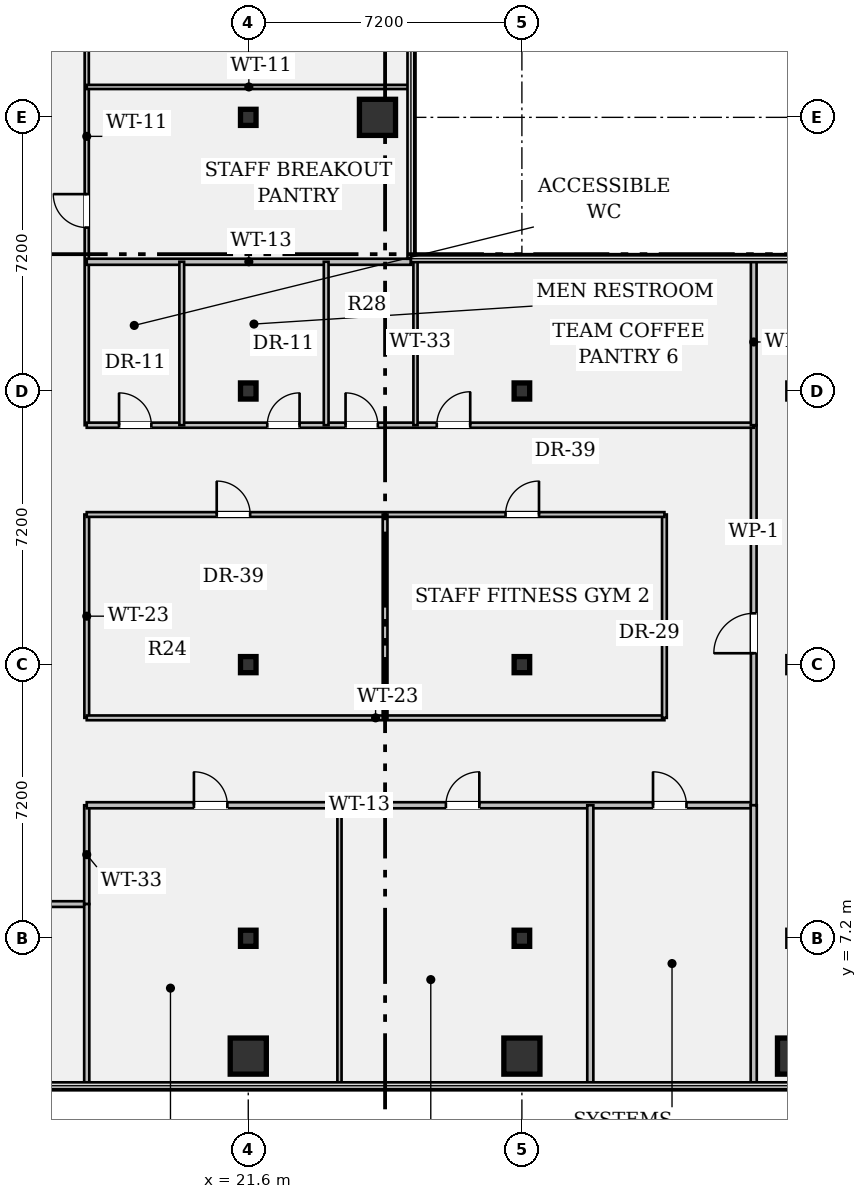
"""IFC4 building model, lengths in metres.
Left out: names, types, materials, properties, quantities, classifications, styles, units other than length and angle.
Written with IfcOpenShell. Run it as: python <this file> out.ifc"""

import sys

from ifc_helpers import new_model, si_unit, direction, frame, frame_2d, origin, origin_2d, place, context, subcontext, project, spatial, rectangle, hollow_rectangle, i_section, extrude, element, fill, save


model = new_model("IFC4")
c1 = context("Model", 3, precision=1e-05, world=origin(), true_north=direction((0.0, 1.0)))
c2 = subcontext(c1, "Body", "Model", "MODEL_VIEW")
j1 = project(units=[si_unit("LENGTHUNIT", "METRE"), si_unit("PLANEANGLEUNIT", "RADIAN")], contexts=[c1])
p1 = place(None, origin())
s1 = spatial("IfcSite", under=j1, at=p1, CompositionType="ELEMENT")
p2 = place(p1, origin())
s2 = spatial("IfcBuilding", under=s1, at=p2, CompositionType="ELEMENT")
p3 = place(p2, frame((0.0, 0.0, 106.05)))
s3 = spatial("IfcBuildingStorey", under=s2, at=p3, CompositionType="ELEMENT", Elevation=106.05)
p4 = place(p3, frame((21.6, 4.1, 0.0), z_axis=(0.0, 0.0, 1.0), x_axis=(1.0, 0.0, 0.0)))
e1 = element("IfcColumn", 1, at=p4, inside=s3, PredefinedType="COLUMN", context=c2, shape_type="SweptSolid", body=[
    extrude(hollow_rectangle(XDim=0.95, YDim=0.95, WallThickness=0.06, at=origin_2d()), origin(), (0.0, 0.0, 1.0), 3.58),
])
for number, where, z_axis, x_axis in (
    (2, (21.6, 7.2, 0.0), (0.0, 0.0, 1.0), (1.0, 0.0, 0.0)),
    (3, (21.6, 14.4, 0.0), (0.0, 0.0, 1.0), (1.0, 0.0, 0.0)),
    (4, (21.6, 21.6, 0.0), (0.0, 0.0, 1.0), (1.0, 0.0, 0.0)),
    (5, (21.6, 28.8, 0.0), (0.0, 0.0, 1.0), (1.0, 0.0, 0.0)),
):
    element("IfcColumn", number, at=place(p3, frame(where, z_axis=z_axis, x_axis=x_axis)), inside=s3, PredefinedType="COLUMN", context=c2, shape_type="SweptSolid", body=[
        extrude(i_section(OverallWidth=0.409, OverallDepth=0.424, WebThickness=0.033, FlangeThickness=0.052, FilletRadius=0.018, at=origin_2d()), origin(), (0.0, 0.0, 1.0), 3.58),
    ])
for number, where, z_axis, x_axis in (
    (6, (25.0, 28.8, 0.0), (0.0, 0.0, 1.0), (1.0, 0.0, 0.0)),
    (7, (28.8, 4.1, 0.0), (0.0, 0.0, 1.0), (1.0, 0.0, 0.0)),
):
    element("IfcColumn", number, at=place(p3, frame(where, z_axis=z_axis, x_axis=x_axis)), inside=s3, PredefinedType="COLUMN", context=c2, shape_type="SweptSolid", body=[
        extrude(hollow_rectangle(XDim=0.95, YDim=0.95, WallThickness=0.06, at=origin_2d()), origin(), (0.0, 0.0, 1.0), 3.58),
    ])
for number, where, z_axis, x_axis in (
    (8, (28.8, 7.2, 0.0), (0.0, 0.0, 1.0), (1.0, 0.0, 0.0)),
    (9, (28.8, 14.4, 0.0), (0.0, 0.0, 1.0), (1.0, 0.0, 0.0)),
    (10, (28.8, 21.6, 0.0), (0.0, 0.0, 1.0), (1.0, 0.0, 0.0)),
):
    element("IfcColumn", number, at=place(p3, frame(where, z_axis=z_axis, x_axis=x_axis)), inside=s3, PredefinedType="COLUMN", context=c2, shape_type="SweptSolid", body=[
        extrude(i_section(OverallWidth=0.409, OverallDepth=0.424, WebThickness=0.033, FlangeThickness=0.052, FilletRadius=0.018, at=origin_2d()), origin(), (0.0, 0.0, 1.0), 3.58),
    ])
p5 = place(p3, frame((36.0, 4.1, 0.0), z_axis=(0.0, 0.0, 1.0), x_axis=(1.0, 0.0, 0.0)))
e11 = element("IfcColumn", 11, at=p5, inside=s3, PredefinedType="COLUMN", context=c2, shape_type="SweptSolid", body=[
    extrude(hollow_rectangle(XDim=0.95, YDim=0.95, WallThickness=0.06, at=origin_2d()), origin(), (0.0, 0.0, 1.0), 3.58),
])
for number, where, z_axis, x_axis in (
    (12, (36.0, 7.2, 0.0), (0.0, 0.0, 1.0), (1.0, 0.0, 0.0)),
    (13, (36.0, 14.4, 0.0), (0.0, 0.0, 1.0), (1.0, 0.0, 0.0)),
    (14, (36.0, 21.6, 0.0), (0.0, 0.0, 1.0), (1.0, 0.0, 0.0)),
):
    element("IfcColumn", number, at=place(p3, frame(where, z_axis=z_axis, x_axis=x_axis)), inside=s3, PredefinedType="COLUMN", context=c2, shape_type="SweptSolid", body=[
        extrude(i_section(OverallWidth=0.409, OverallDepth=0.424, WebThickness=0.033, FlangeThickness=0.052, FilletRadius=0.018, at=origin_2d()), origin(), (0.0, 0.0, 1.0), 3.58),
    ])
p6 = place(p3, frame((14.4, 8.1, 0.0), z_axis=(0.0, 0.0, 1.0), x_axis=(1.0, 0.0, 0.0)))
e15 = element("IfcWall", 15, at=p6, inside=s3, PredefinedType="PARTITIONING", context=c2, shape_type="SweptSolid", body=[
    extrude(rectangle(XDim=2.95, YDim=0.15, at=frame_2d((1.475, 0.0))), origin(), (0.0, 0.0, 1.0), 3.098),
])
p7 = place(p6, frame((0.95, 0.0, 0.0)))
e16 = element("IfcOpeningElement", 16, at=p7, cuts=e15, PredefinedType="OPENING", context=c2, shape_type="SweptSolid", body=[
    extrude(rectangle(XDim=0.88, YDim=2.15, at=frame_2d((0.44, 1.075))), frame((0.0, 0.087, 0.0), z_axis=(0.0, -1.0, 0.0), x_axis=(1.0, 0.0, 0.0)), (0.0, 0.0, 1.0), 0.174),
])
p8 = place(p3, frame((17.35, 8.1, 0.0), z_axis=(0.0, 0.0, 1.0), x_axis=(0.0, 1.0, 0.0)))
e17 = element("IfcWall", 17, at=p8, inside=s3, PredefinedType="PARTITIONING", context=c2, shape_type="SweptSolid", body=[
    extrude(rectangle(XDim=2.6, YDim=0.135, at=frame_2d((1.3, 0.0))), origin(), (0.0, 0.0, 1.0), 3.58),
])
p9 = place(p3, frame((17.35, 20.7, 0.0), z_axis=(0.0, 0.0, 1.0), x_axis=(0.0, 1.0, 0.0)))
e18 = element("IfcWall", 18, at=p9, inside=s3, PredefinedType="PARTITIONING", context=c2, shape_type="SweptSolid", body=[
    extrude(rectangle(XDim=15.2, YDim=0.11, at=frame_2d((7.6, 0.0))), origin(), (0.0, 0.0, 1.0), 2.793),
])
p10 = place(p9, frame((5.2, 0.0, 0.0)))
e19 = element("IfcOpeningElement", 19, at=p10, cuts=e18, PredefinedType="OPENING", context=c2, shape_type="SweptSolid", body=[
    extrude(rectangle(XDim=0.88, YDim=2.15, at=frame_2d((0.44, 1.075))), frame((0.0, 0.067, 0.0), z_axis=(0.0, -1.0, 0.0), x_axis=(1.0, 0.0, 0.0)), (0.0, 0.0, 1.0), 0.134),
])
p11 = place(p9, frame((10.6, 0.0, 0.0)))
e20 = element("IfcOpeningElement", 20, at=p11, cuts=e18, PredefinedType="OPENING", context=c2, shape_type="SweptSolid", body=[
    extrude(rectangle(XDim=1.0, YDim=2.15, at=frame_2d((0.5, 1.075))), frame((0.0, 0.067, 0.0), z_axis=(0.0, -1.0, 0.0), x_axis=(1.0, 0.0, 0.0)), (0.0, 0.0, 1.0), 0.134),
])
p12 = place(p3, frame((17.35, 10.7, 0.0), z_axis=(0.0, 0.0, 1.0), x_axis=(1.0, 0.0, 0.0)))
e21 = element("IfcWall", 21, at=p12, inside=s3, PredefinedType="PARTITIONING", context=c2, shape_type="SweptSolid", body=[
    extrude(rectangle(XDim=17.55, YDim=0.16, at=frame_2d((8.775, 0.0))), origin(), (0.0, 0.0, 1.0), 2.793),
])
p13 = place(p12, frame((2.82, 0.0, 0.0)))
e22 = element("IfcOpeningElement", 22, at=p13, cuts=e21, PredefinedType="OPENING", context=c2, shape_type="SweptSolid", body=[
    extrude(rectangle(XDim=0.88, YDim=2.15, at=frame_2d((0.44, 1.075))), frame((0.0, 0.092, 0.0), z_axis=(0.0, -1.0, 0.0), x_axis=(1.0, 0.0, 0.0)), (0.0, 0.0, 1.0), 0.184),
])
p14 = place(p12, frame((9.45, 0.0, 0.0)))
e23 = element("IfcOpeningElement", 23, at=p14, cuts=e21, PredefinedType="OPENING", context=c2, shape_type="SweptSolid", body=[
    extrude(rectangle(XDim=0.88, YDim=2.15, at=frame_2d((0.44, 1.075))), frame((0.0, 0.092, 0.0), z_axis=(0.0, -1.0, 0.0), x_axis=(1.0, 0.0, 0.0)), (0.0, 0.0, 1.0), 0.184),
])
p15 = place(p12, frame((14.9, 0.0, 0.0)))
e24 = element("IfcOpeningElement", 24, at=p15, cuts=e21, PredefinedType="OPENING", context=c2, shape_type="SweptSolid", body=[
    extrude(rectangle(XDim=0.88, YDim=2.15, at=frame_2d((0.44, 1.075))), frame((0.0, 0.092, 0.0), z_axis=(0.0, -1.0, 0.0), x_axis=(1.0, 0.0, 0.0)), (0.0, 0.0, 1.0), 0.184),
])
p16 = place(p3, frame((34.9, 10.7, 0.0), z_axis=(0.0, 0.0, 1.0), x_axis=(0.0, 1.0, 0.0)))
e25 = element("IfcWall", 25, at=p16, inside=s3, PredefinedType="PARTITIONING", context=c2, shape_type="SweptSolid", body=[
    extrude(rectangle(XDim=10.0, YDim=0.15, at=frame_2d((5.0, 0.0))), origin(), (0.0, 0.0, 1.0), 2.793),
])
p17 = place(p16, frame((4.0, 0.0, 0.0)))
e26 = element("IfcOpeningElement", 26, at=p17, cuts=e25, PredefinedType="OPENING", context=c2, shape_type="SweptSolid", body=[
    extrude(rectangle(XDim=1.05, YDim=2.15, at=frame_2d((0.525, 1.075))), frame((0.0, 0.087, 0.0), z_axis=(0.0, -1.0, 0.0), x_axis=(1.0, 0.0, 0.0)), (0.0, 0.0, 1.0), 0.174),
])
p18 = place(p3, frame((17.35, 20.7, 0.0), z_axis=(0.0, 0.0, 1.0), x_axis=(1.0, 0.0, 0.0)))
e27 = element("IfcWall", 27, at=p18, inside=s3, PredefinedType="PARTITIONING", context=c2, shape_type="SweptSolid", body=[
    extrude(rectangle(XDim=17.55, YDim=0.135, at=frame_2d((8.775, 0.0))), origin(), (0.0, 0.0, 1.0), 2.793),
])
p19 = place(p18, frame((0.85, 0.0, 0.0)))
e28 = element("IfcOpeningElement", 28, at=p19, cuts=e27, PredefinedType="OPENING", context=c2, shape_type="SweptSolid", body=[
    extrude(rectangle(XDim=0.85, YDim=2.15, at=frame_2d((0.425, 1.075))), frame((0.0, 0.08, 0.0), z_axis=(0.0, -1.0, 0.0), x_axis=(1.0, 0.0, 0.0)), (0.0, 0.0, 1.0), 0.159),
])
p20 = place(p18, frame((4.75, 0.0, 0.0)))
e29 = element("IfcOpeningElement", 29, at=p20, cuts=e27, PredefinedType="OPENING", context=c2, shape_type="SweptSolid", body=[
    extrude(rectangle(XDim=0.85, YDim=2.15, at=frame_2d((0.425, 1.075))), frame((0.0, 0.08, 0.0), z_axis=(0.0, -1.0, 0.0), x_axis=(1.0, 0.0, 0.0)), (0.0, 0.0, 1.0), 0.159),
])
p21 = place(p18, frame((6.81, 0.0, 0.0)))
e30 = element("IfcOpeningElement", 30, at=p21, cuts=e27, PredefinedType="OPENING", context=c2, shape_type="SweptSolid", body=[
    extrude(rectangle(XDim=0.85, YDim=2.15, at=frame_2d((0.425, 1.075))), frame((0.0, 0.08, 0.0), z_axis=(0.0, -1.0, 0.0), x_axis=(1.0, 0.0, 0.0)), (0.0, 0.0, 1.0), 0.159),
])
p22 = place(p18, frame((9.21, 0.0, 0.0)))
e31 = element("IfcOpeningElement", 31, at=p22, cuts=e27, PredefinedType="OPENING", context=c2, shape_type="SweptSolid", body=[
    extrude(rectangle(XDim=0.88, YDim=2.15, at=frame_2d((0.44, 1.075))), frame((0.0, 0.08, 0.0), z_axis=(0.0, -1.0, 0.0), x_axis=(1.0, 0.0, 0.0)), (0.0, 0.0, 1.0), 0.159),
])
p23 = place(p3, frame((17.35, 13.0, 0.0), z_axis=(0.0, 0.0, 1.0), x_axis=(0.0, 1.0, 0.0)))
e32 = element("IfcWall", 32, at=p23, inside=s3, PredefinedType="PARTITIONING", context=c2, shape_type="SweptSolid", body=[
    extrude(rectangle(XDim=5.35, YDim=0.125, at=frame_2d((2.675, 0.0))), origin(), (0.0, 0.0, 1.0), 2.793),
])
p24 = place(p3, frame((17.35, 13.0, 0.0), z_axis=(0.0, 0.0, 1.0), x_axis=(1.0, 0.0, 0.0)))
e33 = element("IfcWall", 33, at=p24, inside=s3, PredefinedType="PARTITIONING", context=c2, shape_type="SweptSolid", body=[
    extrude(rectangle(XDim=15.2, YDim=0.125, at=frame_2d((7.6, 0.0))), origin(), (0.0, 0.0, 1.0), 2.793),
])
p25 = place(p3, frame((32.55, 13.0, 0.0), z_axis=(0.0, 0.0, 1.0), x_axis=(0.0, 1.0, 0.0)))
e34 = element("IfcWall", 34, at=p25, inside=s3, PredefinedType="PARTITIONING", context=c2, shape_type="SweptSolid", body=[
    extrude(rectangle(XDim=5.35, YDim=0.125, at=frame_2d((2.675, 0.0))), origin(), (0.0, 0.0, 1.0), 2.793),
])
p26 = place(p3, frame((17.35, 18.35, 0.0), z_axis=(0.0, 0.0, 1.0), x_axis=(1.0, 0.0, 0.0)))
e35 = element("IfcWall", 35, at=p26, inside=s3, PredefinedType="PARTITIONING", context=c2, shape_type="SweptSolid", body=[
    extrude(rectangle(XDim=15.2, YDim=0.125, at=frame_2d((7.6, 0.0))), origin(), (0.0, 0.0, 1.0), 2.793),
])
p27 = place(p26, frame((3.42, 0.0, 0.0)))
e36 = element("IfcOpeningElement", 36, at=p27, cuts=e35, PredefinedType="OPENING", context=c2, shape_type="SweptSolid", body=[
    extrude(rectangle(XDim=0.88, YDim=2.15, at=frame_2d((0.44, 1.075))), frame((0.0, 0.074, 0.0), z_axis=(0.0, -1.0, 0.0), x_axis=(1.0, 0.0, 0.0)), (0.0, 0.0, 1.0), 0.149),
])
p28 = place(p26, frame((11.02, 0.0, 0.0)))
e37 = element("IfcOpeningElement", 37, at=p28, cuts=e35, PredefinedType="OPENING", context=c2, shape_type="SweptSolid", body=[
    extrude(rectangle(XDim=0.88, YDim=2.15, at=frame_2d((0.44, 1.075))), frame((0.0, 0.074, 0.0), z_axis=(0.0, -1.0, 0.0), x_axis=(1.0, 0.0, 0.0)), (0.0, 0.0, 1.0), 0.149),
])
p29 = place(p3, frame((25.2, 13.0, 0.0), z_axis=(0.0, 0.0, 1.0), x_axis=(0.0, 1.0, 0.0)))
e38 = element("IfcWall", 38, at=p29, inside=s3, PredefinedType="PARTITIONING", context=c2, shape_type="SweptSolid", body=[
    extrude(rectangle(XDim=5.35, YDim=0.125, at=frame_2d((2.675, 0.0))), origin(), (0.0, 0.0, 1.0), 2.793),
])
p30 = place(p3, frame((17.35, 25.0, 0.0), z_axis=(0.0, 0.0, 1.0), x_axis=(1.0, 0.0, 0.0)))
e39 = element("IfcWall", 39, at=p30, inside=s3, PredefinedType="PARTITIONING", context=c2, shape_type="SweptSolid", body=[
    extrude(rectangle(XDim=8.53, YDim=0.16, at=frame_2d((4.265, 0.0))), origin(), (0.0, 0.0, 1.0), 2.793),
])
for number, where, z_axis, x_axis in (
    (40, (19.85, 20.7, 0.0), (0.0, 0.0, 1.0), (0.0, 1.0, 0.0)),
    (41, (23.65, 20.7, 0.0), (0.0, 0.0, 1.0), (0.0, 1.0, 0.0)),
):
    element("IfcWall", number, at=place(p3, frame(where, z_axis=z_axis, x_axis=x_axis)), inside=s3, PredefinedType="PARTITIONING", context=c2, shape_type="SweptSolid", body=[
        extrude(rectangle(XDim=4.3, YDim=0.125, at=frame_2d((2.15, 0.0))), origin(), (0.0, 0.0, 1.0), 2.793),
    ])
p31 = place(p3, frame((17.35, 29.6, 0.0), z_axis=(0.0, 0.0, 1.0), x_axis=(1.0, 0.0, 0.0)))
e42 = element("IfcWall", 42, at=p31, inside=s3, PredefinedType="PARTITIONING", context=c2, shape_type="SweptSolid", body=[
    extrude(rectangle(XDim=8.53, YDim=0.11, at=frame_2d((4.265, 0.0))), origin(), (0.0, 0.0, 1.0), 2.793),
])
p32 = place(p3, frame((26.0, 20.7, 0.0), z_axis=(0.0, 0.0, 1.0), x_axis=(0.0, 1.0, 0.0)))
e43 = element("IfcWall", 43, at=p32, inside=s3, PredefinedType="PARTITIONING", context=c2, shape_type="SweptSolid", body=[
    extrude(rectangle(XDim=4.38, YDim=0.11, at=frame_2d((2.19, 0.0))), origin(), (0.0, 0.0, 1.0), 2.793),
])
p33 = place(p3, frame((34.9, 3.32, 0.0), z_axis=(0.0, 0.0, 1.0), x_axis=(0.0, 1.0, 0.0)))
e44 = element("IfcWall", 44, at=p33, inside=s3, PredefinedType="PARTITIONING", context=c2, shape_type="SweptSolid", body=[
    extrude(rectangle(XDim=7.38, YDim=0.16, at=frame_2d((3.69, 0.0))), origin(), (0.0, 0.0, 1.0), 2.793),
])
p34 = place(p3, frame((34.9, 20.7, 0.0), z_axis=(0.0, 0.0, 1.0), x_axis=(0.0, 1.0, 0.0)))
e45 = element("IfcWall", 45, at=p34, inside=s3, PredefinedType="PARTITIONING", context=c2, shape_type="SweptSolid", body=[
    extrude(rectangle(XDim=4.38, YDim=0.15, at=frame_2d((2.19, 0.0))), origin(), (0.0, 0.0, 1.0), 2.793),
])
p35 = place(p3, frame((17.35, 3.32, 0.0), z_axis=(0.0, 0.0, 1.0), x_axis=(0.0, 1.0, 0.0)))
e46 = element("IfcWall", 46, at=p35, inside=s3, PredefinedType="PARTITIONING", context=c2, shape_type="SweptSolid", body=[
    extrude(rectangle(XDim=4.78, YDim=0.135, at=frame_2d((2.39, 0.0))), origin(), (0.0, 0.0, 1.0), 2.793),
])
p36 = place(p3, frame((24.0, 3.32, 0.0), z_axis=(0.0, 0.0, 1.0), x_axis=(0.0, 1.0, 0.0)))
e47 = element("IfcWall", 47, at=p36, inside=s3, PredefinedType="PARTITIONING", context=c2, shape_type="SweptSolid", body=[
    extrude(rectangle(XDim=7.38, YDim=0.11, at=frame_2d((3.69, 0.0))), origin(), (0.0, 0.0, 1.0), 2.793),
])
p37 = place(p3, frame((30.6, 3.32, 0.0), z_axis=(0.0, 0.0, 1.0), x_axis=(0.0, 1.0, 0.0)))
e48 = element("IfcWall", 48, at=p37, inside=s3, PredefinedType="PARTITIONING", context=c2, shape_type="SweptSolid", body=[
    extrude(rectangle(XDim=7.38, YDim=0.16, at=frame_2d((3.69, 0.0))), origin(), (0.0, 0.0, 1.0), 2.793),
])
p38 = place(p27, origin())
e49 = element("IfcDoor", 49, at=p38, inside=s3, OperationType="SINGLE_SWING_LEFT", PredefinedType="DOOR", context=c2, shape_type="SweptSolid", body=[
    extrude(rectangle(XDim=0.88, YDim=2.15, at=frame_2d((0.44, 1.075))), frame((0.0, 0.025, 0.0), z_axis=(0.0, -1.0, 0.0), x_axis=(1.0, 0.0, 0.0)), (0.0, 0.0, 1.0), 0.05),
])
fill(e36, e49)
p39 = place(p28, origin())
e50 = element("IfcDoor", 50, at=p39, inside=s3, OperationType="SINGLE_SWING_RIGHT", PredefinedType="DOOR", context=c2, shape_type="SweptSolid", body=[
    extrude(rectangle(XDim=0.88, YDim=2.15, at=frame_2d((0.44, 1.075))), frame((0.0, 0.025, 0.0), z_axis=(0.0, -1.0, 0.0), x_axis=(1.0, 0.0, 0.0)), (0.0, 0.0, 1.0), 0.05),
])
fill(e37, e50)
p40 = place(p19, origin())
e51 = element("IfcDoor", 51, at=p40, inside=s3, OperationType="SINGLE_SWING_LEFT", PredefinedType="DOOR", context=c2, shape_type="SweptSolid", body=[
    extrude(rectangle(XDim=0.85, YDim=2.15, at=frame_2d((0.425, 1.075))), frame((0.0, 0.025, 0.0), z_axis=(0.0, -1.0, 0.0), x_axis=(1.0, 0.0, 0.0)), (0.0, 0.0, 1.0), 0.05),
])
fill(e28, e51)
p41 = place(p20, origin())
e52 = element("IfcDoor", 52, at=p41, inside=s3, OperationType="SINGLE_SWING_RIGHT", PredefinedType="DOOR", context=c2, shape_type="SweptSolid", body=[
    extrude(rectangle(XDim=0.85, YDim=2.15, at=frame_2d((0.425, 1.075))), frame((0.0, 0.025, 0.0), z_axis=(0.0, -1.0, 0.0), x_axis=(1.0, 0.0, 0.0)), (0.0, 0.0, 1.0), 0.05),
])
fill(e29, e52)
p42 = place(p21, origin())
e53 = element("IfcDoor", 53, at=p42, inside=s3, OperationType="SINGLE_SWING_LEFT", PredefinedType="DOOR", context=c2, shape_type="SweptSolid", body=[
    extrude(rectangle(XDim=0.85, YDim=2.15, at=frame_2d((0.425, 1.075))), frame((0.0, 0.025, 0.0), z_axis=(0.0, -1.0, 0.0), x_axis=(1.0, 0.0, 0.0)), (0.0, 0.0, 1.0), 0.05),
])
fill(e30, e53)
p43 = place(p10, origin())
e54 = element("IfcDoor", 54, at=p43, inside=s3, OperationType="SINGLE_SWING_RIGHT", PredefinedType="DOOR", context=c2, shape_type="SweptSolid", body=[
    extrude(rectangle(XDim=0.88, YDim=2.15, at=frame_2d((0.44, 1.075))), frame((0.0, 0.025, 0.0), z_axis=(0.0, -1.0, 0.0), x_axis=(1.0, 0.0, 0.0)), (0.0, 0.0, 1.0), 0.05),
])
fill(e19, e54)
p44 = place(p22, origin())
e55 = element("IfcDoor", 55, at=p44, inside=s3, OperationType="SINGLE_SWING_RIGHT", PredefinedType="DOOR", context=c2, shape_type="SweptSolid", body=[
    extrude(rectangle(XDim=0.88, YDim=2.15, at=frame_2d((0.44, 1.075))), frame((0.0, 0.025, 0.0), z_axis=(0.0, -1.0, 0.0), x_axis=(1.0, 0.0, 0.0)), (0.0, 0.0, 1.0), 0.05),
])
fill(e31, e55)
p45 = place(p17, origin())
e56 = element("IfcDoor", 56, at=p45, inside=s3, OperationType="SINGLE_SWING_LEFT", PredefinedType="DOOR", context=c2, shape_type="SweptSolid", body=[
    extrude(rectangle(XDim=1.05, YDim=2.15, at=frame_2d((0.525, 1.075))), frame((0.0, 0.025, 0.0), z_axis=(0.0, -1.0, 0.0), x_axis=(1.0, 0.0, 0.0)), (0.0, 0.0, 1.0), 0.05),
])
fill(e26, e56)
p46 = place(p13, origin())
e57 = element("IfcDoor", 57, at=p46, inside=s3, OperationType="SINGLE_SWING_LEFT", PredefinedType="DOOR", context=c2, shape_type="SweptSolid", body=[
    extrude(rectangle(XDim=0.88, YDim=2.15, at=frame_2d((0.44, 1.075))), frame((0.0, 0.025, 0.0), z_axis=(0.0, -1.0, 0.0), x_axis=(1.0, 0.0, 0.0)), (0.0, 0.0, 1.0), 0.05),
])
fill(e22, e57)
p47 = place(p14, origin())
e58 = element("IfcDoor", 58, at=p47, inside=s3, OperationType="SINGLE_SWING_RIGHT", PredefinedType="DOOR", context=c2, shape_type="SweptSolid", body=[
    extrude(rectangle(XDim=0.88, YDim=2.15, at=frame_2d((0.44, 1.075))), frame((0.0, 0.025, 0.0), z_axis=(0.0, -1.0, 0.0), x_axis=(1.0, 0.0, 0.0)), (0.0, 0.0, 1.0), 0.05),
])
fill(e23, e58)
p48 = place(p15, origin())
e59 = element("IfcDoor", 59, at=p48, inside=s3, OperationType="SINGLE_SWING_LEFT", PredefinedType="DOOR", context=c2, shape_type="SweptSolid", body=[
    extrude(rectangle(XDim=0.88, YDim=2.15, at=frame_2d((0.44, 1.075))), frame((0.0, 0.025, 0.0), z_axis=(0.0, -1.0, 0.0), x_axis=(1.0, 0.0, 0.0)), (0.0, 0.0, 1.0), 0.05),
])
fill(e24, e59)
save(model, sys.argv[1])
